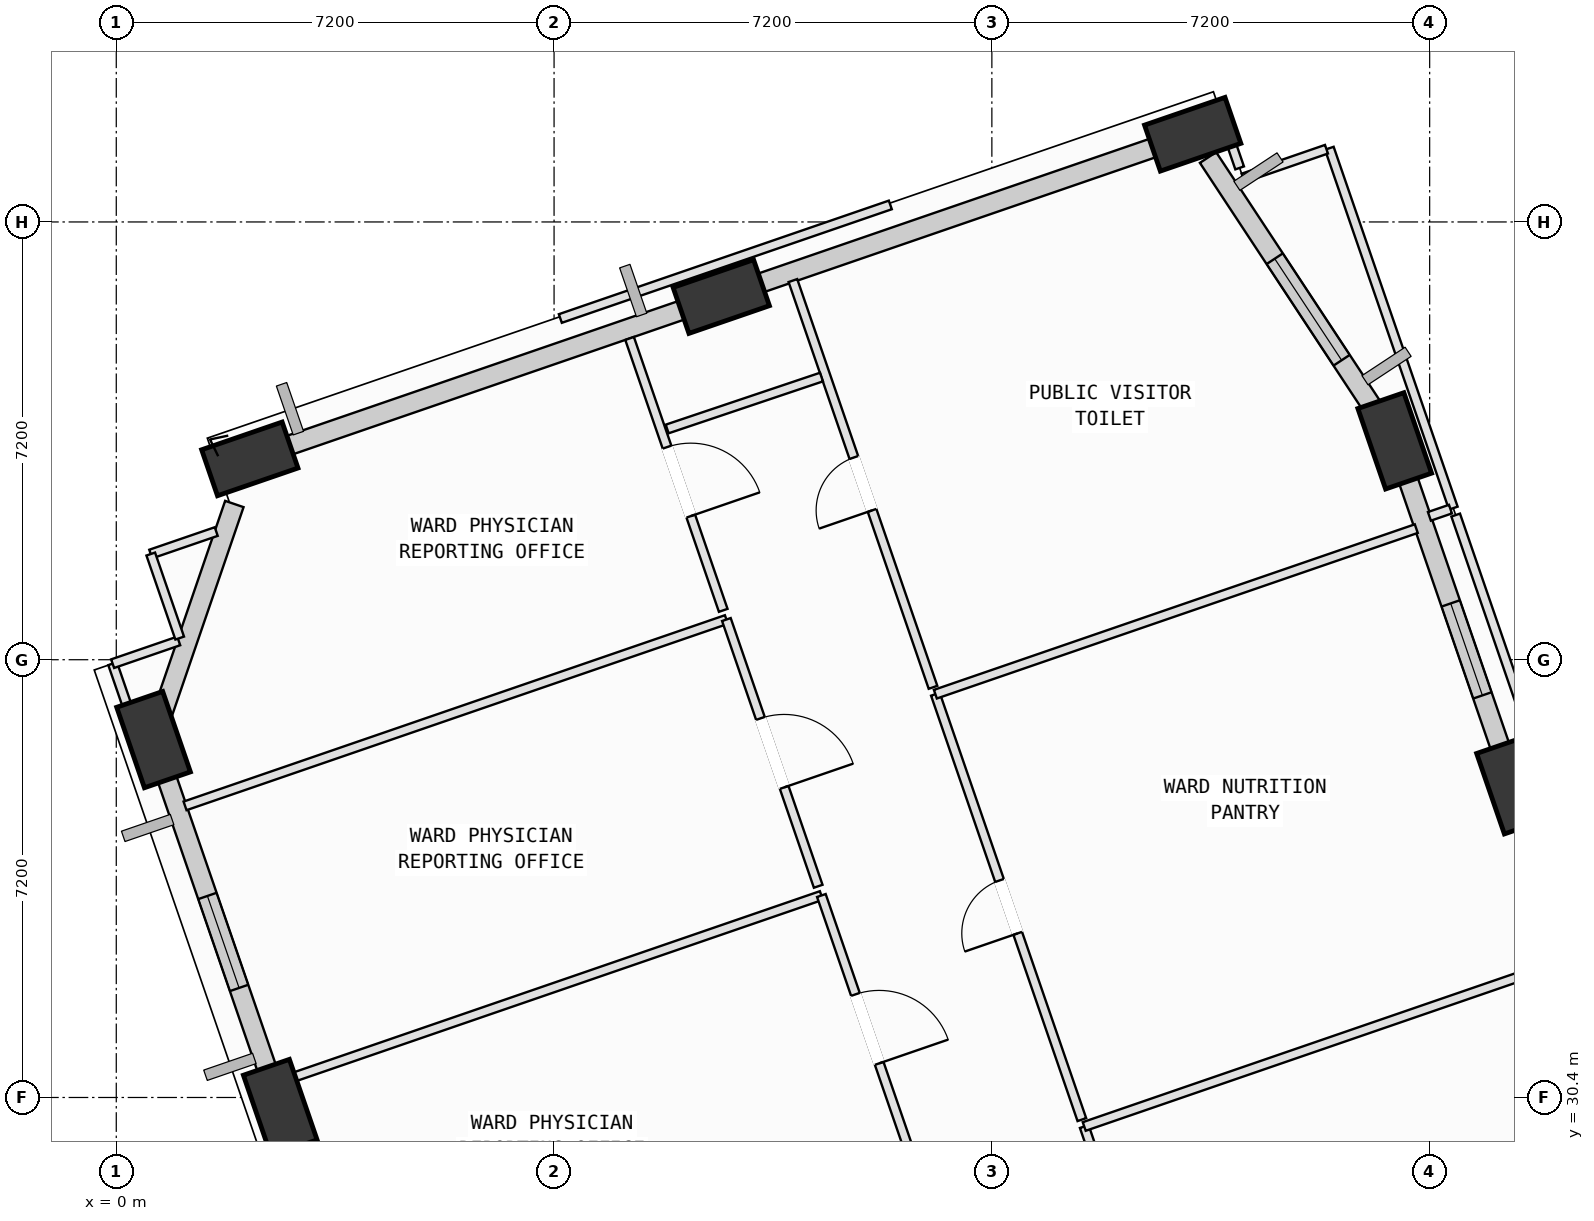
"""IFC4 building model, lengths in metres.
Left out: names, types, materials, properties, quantities, classifications, styles, units other than length and angle.
Written with IfcOpenShell. Run it as: python <this file> out.ifc"""

import sys

from ifc_helpers import new_model, si_unit, direction, frame, frame_2d, origin, origin_2d, place, context, subcontext, project, spatial, rectangle, extrude, element, fill, save


model = new_model("IFC4")
c1 = context("Model", 3, precision=1e-05, world=origin(), true_north=direction((0.0, 1.0)))
c2 = subcontext(c1, "Body", "Model", "MODEL_VIEW")
j1 = project(units=[si_unit("LENGTHUNIT", "METRE"), si_unit("PLANEANGLEUNIT", "RADIAN")], contexts=[c1])
p1 = place(None, origin())
s1 = spatial("IfcSite", under=j1, at=p1, CompositionType="ELEMENT")
p2 = place(p1, origin())
s2 = spatial("IfcBuilding", under=s1, at=p2, CompositionType="ELEMENT")
p3 = place(p2, frame((0.0, 0.0, 104.4)))
s3 = spatial("IfcBuildingStorey", under=s2, at=p3, CompositionType="ELEMENT", Elevation=104.4)
p4 = place(p3, frame((22.979, 35.527, 0.002), z_axis=(-0.044021610011, -0.044326468806, 0.998046723363), x_axis=(0.433965713983, 0.898990928956, 0.059068339596)))
e1 = element("IfcColumn", 1, at=p4, inside=s3, PredefinedType="COLUMN", context=c2, shape_type="SweptSolid", body=[
    extrude(rectangle(XDim=1.4, YDim=0.8, at=origin_2d()), origin(), (0.0, 0.0, 1.0), 4.004),
])
p5 = place(p3, frame((21.026, 41.2, 0.002), z_axis=(-0.067319967369, -0.052529052296, 0.996347690647), x_axis=(0.542435460249, 0.836208902445, 0.080736874693)))
e2 = element("IfcColumn", 2, at=p5, inside=s3, PredefinedType="COLUMN", context=c2, shape_type="SweptSolid", body=[
    extrude(rectangle(XDim=1.4, YDim=0.8, at=origin_2d()), origin(), (0.0, 0.0, 1.0), 4.011),
])
p6 = place(p3, frame((17.703, 46.242, 0.002), z_axis=(-0.087802098042, -0.066185537252, 0.993936751629), x_axis=(0.827550237505, -0.560249192441, 0.03579730122)))
e3 = element("IfcColumn", 3, at=p6, inside=s3, PredefinedType="COLUMN", context=c2, shape_type="SweptSolid", body=[
    extrude(rectangle(XDim=1.4, YDim=0.8, at=origin_2d()), origin(), (0.0, 0.0, 1.0), 4.021),
])
p7 = place(p3, frame((9.949, 43.573, 0.002), z_axis=(-0.076379070002, -0.097898569883, 0.99226110862), x_axis=(0.944191003905, -0.326908449658, 0.040425408927)))
e4 = element("IfcColumn", 4, at=p7, inside=s3, PredefinedType="COLUMN", context=c2, shape_type="SweptSolid", body=[
    extrude(rectangle(XDim=1.4, YDim=0.8, at=origin_2d()), origin(), (0.0, 0.0, 1.0), 4.028),
])
p8 = place(p3, frame((2.196, 40.903, 0.002), z_axis=(-0.064981154168, -0.129357832483, 0.989466523324), x_axis=(0.989509068542, -0.136567126469, 0.047129855094)))
e5 = element("IfcColumn", 5, at=p8, inside=s3, PredefinedType="COLUMN", context=c2, shape_type="SweptSolid", body=[
    extrude(rectangle(XDim=1.4, YDim=0.8, at=origin_2d()), origin(), (0.0, 0.0, 1.0), 4.039),
])
p9 = place(p3, frame((0.613, 36.286, 0.002), z_axis=(-0.045950038231, -0.135733994511, 0.989679178684), x_axis=(-0.008321349387, 0.990743278816, 0.13549358149)))
e6 = element("IfcColumn", 6, at=p9, inside=s3, PredefinedType="COLUMN", context=c2, shape_type="SweptSolid", body=[
    extrude(rectangle(XDim=1.4, YDim=0.8, at=origin_2d()), origin(), (0.0, 0.0, 1.0), 4.038),
])
p10 = place(p3, frame((2.697, 30.235, 0.002), z_axis=(-0.02126385017, -0.1272196164, 0.991646619456), x_axis=(-0.166541332552, 0.978463301857, 0.121957170638)))
e7 = element("IfcColumn", 7, at=p10, inside=s3, PredefinedType="COLUMN", context=c2, shape_type="SweptSolid", body=[
    extrude(rectangle(XDim=1.4, YDim=0.8, at=origin_2d()), origin(), (0.0, 0.0, 1.0), 4.03),
])
p11 = place(p3, frame((21.197, 40.704, 0.0), z_axis=(0.0, 0.0, 1.0), x_axis=(0.3255434245, -0.945527090445, 0.0)))
e8 = element("IfcWall", 8, at=p11, inside=s3, PredefinedType="SOLIDWALL", context=c2, shape_type="SweptSolid", body=[
    extrude(rectangle(XDim=5.047, YDim=0.32, at=frame_2d((2.523, 0.0))), origin(), (0.0, 0.0, 1.0), 3.165),
])
p12 = place(p11, frame((2.303, 0.0, 0.75)))
e9 = element("IfcOpeningElement", 9, at=p12, cuts=e8, PredefinedType="OPENING", context=c2, shape_type="SweptSolid", body=[
    extrude(rectangle(XDim=1.6, YDim=1.95, at=frame_2d((0.8, 0.975))), frame((0.0, 0.17, 0.0), z_axis=(0.0, -1.0, 0.0), x_axis=(1.0, 0.0, 0.0)), (0.0, 0.0, 1.0), 0.34),
])
p13 = place(p3, frame((17.955, 45.86, 0.0), z_axis=(0.0, 0.0, 1.0), x_axis=(0.550210023936, -0.835026304712, 0.0)))
e10 = element("IfcWall", 10, at=p13, inside=s3, PredefinedType="SOLIDWALL", context=c2, shape_type="SweptSolid", body=[
    extrude(rectangle(XDim=5.129, YDim=0.32, at=frame_2d((2.564, 0.0))), origin(), (0.0, 0.0, 1.0), 3.165),
])
p14 = place(p13, frame((1.993, 0.0, 0.75)))
e11 = element("IfcOpeningElement", 11, at=p14, cuts=e10, PredefinedType="OPENING", context=c2, shape_type="SweptSolid", body=[
    extrude(rectangle(XDim=2.0, YDim=1.95, at=frame_2d((1.0, 0.975))), frame((0.0, 0.17, 0.0), z_axis=(0.0, -1.0, 0.0), x_axis=(1.0, 0.0, 0.0)), (0.0, 0.0, 1.0), 0.34),
])
p15 = place(p3, frame((10.202, 43.66, 0.0), z_axis=(0.0, 0.0, 1.0), x_axis=(0.945513903464, 0.325581723007, 0.0)))
e12 = element("IfcWall", 12, at=p15, inside=s3, PredefinedType="SOLIDWALL", context=c2, shape_type="SweptSolid", body=[
    extrude(rectangle(XDim=7.231, YDim=0.32, at=frame_2d((3.615, 0.0))), origin(), (0.0, 0.0, 1.0), 3.165),
])
p16 = place(p3, frame((2.426, 40.982, 0.0), z_axis=(0.0, 0.0, 1.0), x_axis=(0.945517420699, 0.325571508512, 0.0)))
e13 = element("IfcWall", 13, at=p16, inside=s3, PredefinedType="SOLIDWALL", context=c2, shape_type="SweptSolid", body=[
    extrude(rectangle(XDim=7.27, YDim=0.32, at=frame_2d((3.635, 0.0))), origin(), (0.0, 0.0, 1.0), 3.165),
])
p17 = place(p3, frame((0.68, 36.482, 0.0), z_axis=(0.0, 0.0, 1.0), x_axis=(0.324313091485, 0.945949797131, 0.0)))
e14 = element("IfcWall", 14, at=p17, inside=s3, PredefinedType="SOLIDWALL", context=c2, shape_type="SweptSolid", body=[
    extrude(rectangle(XDim=3.89, YDim=0.32, at=frame_2d((1.945, 0.0))), origin(), (0.0, 0.0, 1.0), 3.165),
])
p18 = place(p3, frame((2.615, 30.473, 0.0), z_axis=(0.0, 0.0, 1.0), x_axis=(-0.325596232986, 0.94550890692, 0.0)))
e15 = element("IfcWall", 15, at=p18, inside=s3, PredefinedType="SOLIDWALL", context=c2, shape_type="SweptSolid", body=[
    extrude(rectangle(XDim=5.456, YDim=0.32, at=frame_2d((2.728, 0.0))), origin(), (0.0, 0.0, 1.0), 3.165),
])
p19 = place(p18, frame((1.828, 0.0, 0.75)))
e16 = element("IfcOpeningElement", 16, at=p19, cuts=e15, PredefinedType="OPENING", context=c2, shape_type="SweptSolid", body=[
    extrude(rectangle(XDim=1.6, YDim=1.95, at=frame_2d((0.8, 0.975))), frame((0.0, 0.17, 0.0), z_axis=(0.0, -1.0, 0.0), x_axis=(1.0, 0.0, 0.0)), (0.0, 0.0, 1.0), 0.34),
])
p20 = place(p3, frame((2.694, 30.657, 0.0), z_axis=(0.0, 0.0, 1.0), x_axis=(0.945525547677, 0.325547905368, 0.0)))
e17 = element("IfcWall", 17, at=p20, inside=s3, PredefinedType="PARTITIONING", context=c2, shape_type="SweptSolid", body=[
    extrude(rectangle(XDim=9.415, YDim=0.15, at=frame_2d((4.708, 0.0))), origin(), (0.0, 0.0, 1.0), 3.78),
])
p21 = place(p3, frame((11.596, 33.722, 0.0), z_axis=(0.0, 0.0, 1.0), x_axis=(0.325651749866, -0.945489787258, 0.0)))
e18 = element("IfcWall", 18, at=p21, inside=s3, PredefinedType="PARTITIONING", context=c2, shape_type="SweptSolid", body=[
    extrude(rectangle(XDim=4.64, YDim=0.15, at=frame_2d((2.32, 0.0))), origin(), (0.0, 0.0, 1.0), 2.965),
])
p22 = place(p21, frame((1.72, 0.0, 0.0)))
e19 = element("IfcOpeningElement", 19, at=p22, cuts=e18, PredefinedType="OPENING", context=c2, shape_type="SweptSolid", body=[
    extrude(rectangle(XDim=1.2, YDim=2.15, at=frame_2d((0.6, 1.075))), frame((0.0, 0.085, 0.0), z_axis=(0.0, -1.0, 0.0), x_axis=(1.0, 0.0, 0.0)), (0.0, 0.0, 1.0), 0.17),
])
p23 = place(p3, frame((2.71, 29.49, 0.0), z_axis=(0.0, 0.0, 1.0), x_axis=(-0.325896670091, 0.94540539475, 0.0)))
e20 = element("IfcWall", 20, at=p23, inside=s3, PredefinedType="PARTITIONING", context=c2, shape_type="SweptSolid", body=[
    extrude(rectangle(XDim=0.96, YDim=0.15, at=frame_2d((0.48, 0.0))), origin(), (0.0, 0.0, 1.0), 3.165),
])
p24 = place(p3, frame((1.131, 35.196, 0.0), z_axis=(0.0, 0.0, 1.0), x_axis=(0.945536539221, 0.325515979635, 0.0)))
e21 = element("IfcWall", 21, at=p24, inside=s3, PredefinedType="PARTITIONING", context=c2, shape_type="SweptSolid", body=[
    extrude(rectangle(XDim=9.416, YDim=0.15, at=frame_2d((4.708, 0.0))), origin(), (0.0, 0.0, 1.0), 3.78),
])
p25 = place(p3, frame((10.034, 38.261, 0.0), z_axis=(0.0, 0.0, 1.0), x_axis=(0.32546357949, -0.94555457718, 0.0)))
e22 = element("IfcWall", 22, at=p25, inside=s3, PredefinedType="PARTITIONING", context=c2, shape_type="SweptSolid", body=[
    extrude(rectangle(XDim=4.64, YDim=0.15, at=frame_2d((2.32, 0.0))), origin(), (0.0, 0.0, 1.0), 2.965),
])
p26 = place(p25, frame((1.72, 0.0, 0.0)))
e23 = element("IfcOpeningElement", 23, at=p26, cuts=e22, PredefinedType="OPENING", context=c2, shape_type="SweptSolid", body=[
    extrude(rectangle(XDim=1.2, YDim=2.15, at=frame_2d((0.6, 1.075))), frame((0.0, 0.085, 0.0), z_axis=(0.0, -1.0, 0.0), x_axis=(1.0, 0.0, 0.0)), (0.0, 0.0, 1.0), 0.17),
])
p27 = place(p3, frame((0.567, 39.338, 0.0), z_axis=(0.0, 0.0, 1.0), x_axis=(0.945727777546, 0.324959952575, 0.0)))
e24 = element("IfcWall", 24, at=p27, inside=s3, PredefinedType="PARTITIONING", context=c2, shape_type="SweptSolid", body=[
    extrude(rectangle(XDim=1.139, YDim=0.15, at=frame_2d((0.569, 0.0))), origin(), (0.0, 0.0, 1.0), 3.78),
])
p28 = place(p3, frame((1.758, 40.488, 0.0), z_axis=(0.0, 0.0, 1.0), x_axis=(0.945461369306, 0.325734246205, 0.0)))
e25 = element("IfcWall", 25, at=p28, inside=s3, PredefinedType="PARTITIONING", context=c2, shape_type="SweptSolid", body=[
    extrude(rectangle(XDim=0.792, YDim=0.15, at=frame_2d((0.396, 0.0))), origin(), (0.0, 0.0, 1.0), 3.165),
])
p29 = place(p3, frame((8.442, 42.884, 0.0), z_axis=(0.0, 0.0, 1.0), x_axis=(0.325612045408, -0.945503461594, 0.0)))
e26 = element("IfcWall", 26, at=p29, inside=s3, PredefinedType="PARTITIONING", context=c2, shape_type="SweptSolid", body=[
    extrude(rectangle(XDim=4.73, YDim=0.15, at=frame_2d((2.365, 0.0))), origin(), (0.0, 0.0, 1.0), 2.965),
])
p30 = place(p29, frame((1.89, 0.0, 0.0)))
e27 = element("IfcOpeningElement", 27, at=p30, cuts=e26, PredefinedType="OPENING", context=c2, shape_type="SweptSolid", body=[
    extrude(rectangle(XDim=1.2, YDim=2.15, at=frame_2d((0.6, 1.075))), frame((0.0, 0.085, 0.0), z_axis=(0.0, -1.0, 0.0), x_axis=(1.0, 0.0, 0.0)), (0.0, 0.0, 1.0), 0.17),
])
p31 = place(p3, frame((0.621, 35.557, 0.0), z_axis=(0.0, 0.0, 1.0), x_axis=(-0.325595038059, 0.945509318405, 0.0)))
e28 = element("IfcWall", 28, at=p31, inside=s3, PredefinedType="PARTITIONING", context=c2, shape_type="SweptSolid", body=[
    extrude(rectangle(XDim=2.092, YDim=0.15, at=frame_2d((1.046, 0.0))), origin(), (0.0, 0.0, 1.0), 3.165),
])
p32 = place(p3, frame((-0.06, 37.535, 0.0), z_axis=(0.0, 0.0, 1.0), x_axis=(0.94560292547, 0.325323081478, 0.0)))
e29 = element("IfcWall", 29, at=p32, inside=s3, PredefinedType="PARTITIONING", context=c2, shape_type="SweptSolid", body=[
    extrude(rectangle(XDim=1.15, YDim=0.15, at=frame_2d((0.575, 0.0))), origin(), (0.0, 0.0, 1.0), 3.78),
])
p33 = place(p3, frame((1.043, 37.956, 0.0), z_axis=(0.0, 0.0, 1.0), x_axis=(-0.325733272808, 0.945461704664, 0.0)))
e30 = element("IfcWall", 30, at=p33, inside=s3, PredefinedType="PARTITIONING", context=c2, shape_type="SweptSolid", body=[
    extrude(rectangle(XDim=1.461, YDim=0.15, at=frame_2d((0.731, 0.0))), origin(), (0.0, 0.0, 1.0), 3.78),
])
p34 = place(p3, frame((18.634, 22.037, 0.0), z_axis=(0.0, 0.0, 1.0), x_axis=(-0.325538681008, 0.945528723608, 0.0)))
e31 = element("IfcWall", 31, at=p34, inside=s3, PredefinedType="PARTITIONING", context=c2, shape_type="SweptSolid", body=[
    extrude(rectangle(XDim=8.34, YDim=0.15, at=frame_2d((4.17, 0.0))), origin(), (0.0, 0.0, 1.0), 3.78),
])
p35 = place(p34, frame((3.57, 0.0, 0.0)))
e32 = element("IfcOpeningElement", 32, at=p35, cuts=e31, PredefinedType="OPENING", context=c2, shape_type="SweptSolid", body=[
    extrude(rectangle(XDim=1.2, YDim=2.15, at=frame_2d((0.6, 1.075))), frame((0.0, 0.085, 0.0), z_axis=(0.0, -1.0, 0.0), x_axis=(1.0, 0.0, 0.0)), (0.0, 0.0, 1.0), 0.17),
])
p36 = place(p3, frame((15.919, 29.923, 0.0), z_axis=(0.0, 0.0, 1.0), x_axis=(0.945531989451, 0.325529195195, 0.0)))
e33 = element("IfcWall", 33, at=p36, inside=s3, PredefinedType="PARTITIONING", context=c2, shape_type="SweptSolid", body=[
    extrude(rectangle(XDim=8.365, YDim=0.15, at=frame_2d((4.182, 0.0))), origin(), (0.0, 0.0, 1.0), 3.78),
])
p37 = place(p3, frame((15.88, 30.036, 0.0), z_axis=(0.0, 0.0, 1.0), x_axis=(-0.325525994822, 0.945533091274, 0.0)))
e34 = element("IfcWall", 34, at=p37, inside=s3, PredefinedType="PARTITIONING", context=c2, shape_type="SweptSolid", body=[
    extrude(rectangle(XDim=7.4, YDim=0.15, at=frame_2d((3.7, 0.0))), origin(), (0.0, 0.0, 1.0), 3.78),
])
p38 = place(p37, frame((3.24, 0.0, 0.0)))
e35 = element("IfcOpeningElement", 35, at=p38, cuts=e34, PredefinedType="OPENING", context=c2, shape_type="SweptSolid", body=[
    extrude(rectangle(XDim=0.92, YDim=2.1, at=frame_2d((0.46, 1.05))), frame((0.0, 0.085, 0.0), z_axis=(0.0, -1.0, 0.0), x_axis=(1.0, 0.0, 0.0)), (0.0, 0.0, 1.0), 0.17),
])
p39 = place(p3, frame((13.471, 37.033, 0.0), z_axis=(0.0, 0.0, 1.0), x_axis=(0.945523005287, 0.325555289426, 0.0)))
e36 = element("IfcWall", 36, at=p39, inside=s3, PredefinedType="PARTITIONING", context=c2, shape_type="SweptSolid", body=[
    extrude(rectangle(XDim=8.365, YDim=0.15, at=frame_2d((4.182, 0.0))), origin(), (0.0, 0.0, 1.0), 3.78),
])
p40 = place(p3, frame((22.028, 39.979, 0.0), z_axis=(0.0, 0.0, 1.0), x_axis=(0.325566618003, -0.945519104641, 0.0)))
e37 = element("IfcWall", 37, at=p40, inside=s3, PredefinedType="PARTITIONING", context=c2, shape_type="SweptSolid", body=[
    extrude(rectangle(XDim=7.399, YDim=0.15, at=frame_2d((3.7, 0.0))), origin(), (0.0, 0.0, 1.0), 3.78),
])
p41 = place(p3, frame((19.95, 46.012, 0.0), z_axis=(0.0, 0.0, 1.0), x_axis=(0.325711839192, -0.945469088765, 0.0)))
e38 = element("IfcWall", 38, at=p41, inside=s3, PredefinedType="PARTITIONING", context=c2, shape_type="SweptSolid", body=[
    extrude(rectangle(XDim=6.26, YDim=0.15, at=frame_2d((3.13, 0.0))), origin(), (0.0, 0.0, 1.0), 3.78),
])
p42 = place(p3, frame((21.942, 40.077, 0.0), z_axis=(0.0, 0.0, 1.0), x_axis=(-0.945705832759, -0.325023811259, 0.0)))
e39 = element("IfcWall", 39, at=p42, inside=s3, PredefinedType="PARTITIONING", context=c2, shape_type="SweptSolid", body=[
    extrude(rectangle(XDim=0.366, YDim=0.15, at=frame_2d((0.183, 0.0))), origin(), (0.0, 0.0, 1.0), 3.78),
])
p43 = place(p3, frame((13.432, 37.146, 0.0), z_axis=(0.0, 0.0, 1.0), x_axis=(-0.325621666286, 0.945500148305, 0.0)))
e40 = element("IfcWall", 40, at=p43, inside=s3, PredefinedType="PARTITIONING", context=c2, shape_type="SweptSolid", body=[
    extrude(rectangle(XDim=7.075, YDim=0.15, at=frame_2d((3.538, 0.0))), origin(), (0.0, 0.0, 1.0), 3.78),
])
p44 = place(p43, frame((3.078, 0.0, 0.0)))
e41 = element("IfcOpeningElement", 41, at=p44, cuts=e40, PredefinedType="OPENING", context=c2, shape_type="SweptSolid", body=[
    extrude(rectangle(XDim=0.92, YDim=2.1, at=frame_2d((0.46, 1.05))), frame((0.0, 0.085, 0.0), z_axis=(0.0, -1.0, 0.0), x_axis=(1.0, 0.0, 0.0)), (0.0, 0.0, 1.0), 0.17),
])
p45 = place(p3, frame((16.977, 46.193, 0.0), z_axis=(0.0, 0.0, 1.0), x_axis=(0.945437195441, 0.325804403709, 0.0)))
e42 = element("IfcWall", 42, at=p45, inside=s3, PredefinedType="PARTITIONING", context=c2, shape_type="SweptSolid", body=[
    extrude(rectangle(XDim=1.252, YDim=0.15, at=frame_2d((0.626, 0.0))), origin(), (0.0, 0.0, 1.0), 3.165),
])
p46 = place(p3, frame((18.177, 46.554, 0.0), z_axis=(0.0, 0.0, 1.0), x_axis=(0.325817979982, -0.945432516852, 0.0)))
e43 = element("IfcWall", 43, at=p46, inside=s3, PredefinedType="PARTITIONING", context=c2, shape_type="SweptSolid", body=[
    extrude(rectangle(XDim=0.915, YDim=0.15, at=frame_2d((0.458, 0.0))), origin(), (0.0, 0.0, 1.0), 3.78),
])
p47 = place(p3, frame((18.532, 45.523, 0.0), z_axis=(0.0, 0.0, 1.0), x_axis=(0.945297828625, 0.326208545562, 0.0)))
e44 = element("IfcWall", 44, at=p47, inside=s3, PredefinedType="PARTITIONING", context=c2, shape_type="SweptSolid", body=[
    extrude(rectangle(XDim=1.45, YDim=0.15, at=frame_2d((0.725, 0.0))), origin(), (0.0, 0.0, 1.0), 3.78),
])
p48 = place(p3, frame((11.598, 42.249, 0.0), z_axis=(0.0, 0.0, 1.0), x_axis=(-0.947776788702, -0.318934411436, 0.0)))
e45 = element("IfcWall", 45, at=p48, inside=s3, PredefinedType="PARTITIONING", context=c2, shape_type="SweptSolid", body=[
    extrude(rectangle(XDim=2.678, YDim=0.15, at=frame_2d((1.339, 0.0))), origin(), (0.0, 0.0, 1.0), 3.78),
])
p49 = place(p3, frame((7.303, 43.212, 0.0), z_axis=(0.0, 0.0, 1.0), x_axis=(0.945545526699, 0.325489872253, 0.0)))
e46 = element("IfcWall", 46, at=p49, inside=s3, PredefinedType="PARTITIONING", context=c2, shape_type="SweptSolid", body=[
    extrude(rectangle(XDim=5.74, YDim=0.15, at=frame_2d((2.87, 0.0))), origin(), (0.0, 0.0, 1.0), 3.78),
])
p50 = place(p12, origin())
e47 = element("IfcWindow", 47, at=p50, inside=s3, PartitioningType="SINGLE_PANEL", PredefinedType="WINDOW", context=c2, shape_type="SweptSolid", body=[
    extrude(rectangle(XDim=1.6, YDim=1.95, at=frame_2d((0.8, 0.975))), frame((0.0, 0.03, 0.0), z_axis=(0.0, -1.0, 0.0), x_axis=(1.0, 0.0, 0.0)), (0.0, 0.0, 1.0), 0.06),
])
fill(e9, e47)
p51 = place(p14, origin())
e48 = element("IfcWindow", 48, at=p51, inside=s3, PartitioningType="SINGLE_PANEL", PredefinedType="WINDOW", context=c2, shape_type="SweptSolid", body=[
    extrude(rectangle(XDim=2.0, YDim=1.95, at=frame_2d((1.0, 0.975))), frame((0.0, 0.03, 0.0), z_axis=(0.0, -1.0, 0.0), x_axis=(1.0, 0.0, 0.0)), (0.0, 0.0, 1.0), 0.06),
])
fill(e11, e48)
p52 = place(p19, origin())
e49 = element("IfcWindow", 49, at=p52, inside=s3, PartitioningType="SINGLE_PANEL", PredefinedType="WINDOW", context=c2, shape_type="SweptSolid", body=[
    extrude(rectangle(XDim=1.6, YDim=1.95, at=frame_2d((0.8, 0.975))), frame((0.0, 0.03, 0.0), z_axis=(0.0, -1.0, 0.0), x_axis=(1.0, 0.0, 0.0)), (0.0, 0.0, 1.0), 0.06),
])
fill(e16, e49)
p53 = place(p22, origin())
e50 = element("IfcDoor", 50, at=p53, inside=s3, OperationType="SINGLE_SWING_RIGHT", PredefinedType="DOOR", context=c2, shape_type="SweptSolid", body=[
    extrude(rectangle(XDim=1.2, YDim=2.15, at=frame_2d((0.6, 1.075))), frame((0.0, 0.025, 0.0), z_axis=(0.0, -1.0, 0.0), x_axis=(1.0, 0.0, 0.0)), (0.0, 0.0, 1.0), 0.05),
])
fill(e19, e50)
p54 = place(p26, origin())
e51 = element("IfcDoor", 51, at=p54, inside=s3, OperationType="SINGLE_SWING_RIGHT", PredefinedType="DOOR", context=c2, shape_type="SweptSolid", body=[
    extrude(rectangle(XDim=1.2, YDim=2.15, at=frame_2d((0.6, 1.075))), frame((0.0, 0.025, 0.0), z_axis=(0.0, -1.0, 0.0), x_axis=(1.0, 0.0, 0.0)), (0.0, 0.0, 1.0), 0.05),
])
fill(e23, e51)
p55 = place(p30, origin())
e52 = element("IfcDoor", 52, at=p55, inside=s3, OperationType="SINGLE_SWING_RIGHT", PredefinedType="DOOR", context=c2, shape_type="SweptSolid", body=[
    extrude(rectangle(XDim=1.2, YDim=2.15, at=frame_2d((0.6, 1.075))), frame((0.0, 0.025, 0.0), z_axis=(0.0, -1.0, 0.0), x_axis=(1.0, 0.0, 0.0)), (0.0, 0.0, 1.0), 0.05),
])
fill(e27, e52)
p56 = place(p38, origin())
e53 = element("IfcDoor", 53, at=p56, inside=s3, OperationType="SINGLE_SWING_LEFT", PredefinedType="DOOR", context=c2, shape_type="SweptSolid", body=[
    extrude(rectangle(XDim=0.92, YDim=2.1, at=frame_2d((0.46, 1.05))), frame((0.0, 0.025, 0.0), z_axis=(0.0, -1.0, 0.0), x_axis=(1.0, 0.0, 0.0)), (0.0, 0.0, 1.0), 0.05),
])
fill(e35, e53)
p57 = place(p44, origin())
e54 = element("IfcDoor", 54, at=p57, inside=s3, OperationType="SINGLE_SWING_LEFT", PredefinedType="DOOR", context=c2, shape_type="SweptSolid", body=[
    extrude(rectangle(XDim=0.92, YDim=2.1, at=frame_2d((0.46, 1.05))), frame((0.0, 0.025, 0.0), z_axis=(0.0, -1.0, 0.0), x_axis=(1.0, 0.0, 0.0)), (0.0, 0.0, 1.0), 0.05),
])
fill(e41, e54)
save(model, sys.argv[1])
